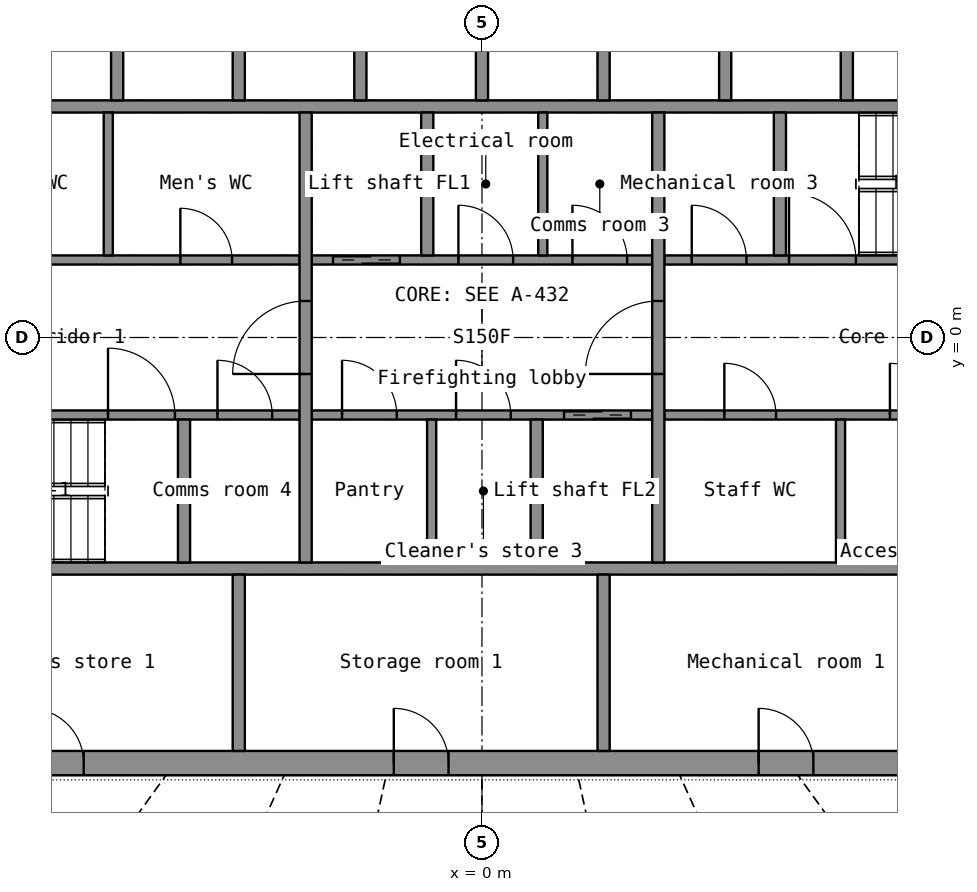
"""IFC4 building model, lengths in metres.
Left out: names, types, materials, properties, quantities, classifications, styles, units other than length and angle.
Written with IfcOpenShell. Run it as: python <this file> out.ifc"""

import sys

from ifc_helpers import new_model, si_unit, direction, frame, frame_2d, origin, place, context, subcontext, project, spatial, rectangle, extrude, element, fill, save


model = new_model("IFC4")
c1 = context("Model", 3, precision=1e-05, world=origin(), true_north=direction((0.0, 1.0)))
c2 = subcontext(c1, "Body", "Model", "MODEL_VIEW")
j1 = project(units=[si_unit("LENGTHUNIT", "METRE"), si_unit("PLANEANGLEUNIT", "RADIAN")], contexts=[c1])
p1 = place(None, origin())
s1 = spatial("IfcSite", under=j1, at=p1, CompositionType="ELEMENT")
p2 = place(p1, origin())
s2 = spatial("IfcBuilding", under=s1, at=p2, CompositionType="ELEMENT")
p3 = place(p2, frame((0.0, 0.0, 257.8)))
s3 = spatial("IfcBuildingStorey", under=s2, at=p3, CompositionType="ELEMENT", Elevation=257.8)
p4 = place(p3, frame((-11.6, -7.0, 0.0), z_axis=(0.0, 0.0, 1.0), x_axis=(1.0, 0.0, 0.0)))
e1 = element("IfcWall", 1, at=p4, inside=s3, PredefinedType="SHEAR", context=c2, shape_type="SweptSolid", body=[
    extrude(rectangle(XDim=23.2, YDim=0.4, at=frame_2d((11.6, 0.0))), origin(), (0.0, 0.0, 1.0), 3.3),
])
p5 = place(p4, frame((20.05, 0.0, 0.0)))
e2 = element("IfcOpeningElement", 2, at=p5, cuts=e1, PredefinedType="OPENING", context=c2, shape_type="SweptSolid", body=[
    extrude(rectangle(XDim=1.1, YDim=2.2, at=frame_2d((0.55, 1.1))), frame((0.0, 0.21, 0.0), z_axis=(0.0, -1.0, 0.0), x_axis=(1.0, 0.0, 0.0)), (0.0, 0.0, 1.0), 0.42),
])
p6 = place(p4, frame((4.15, 0.0, 0.0)))
e3 = element("IfcOpeningElement", 3, at=p6, cuts=e1, PredefinedType="OPENING", context=c2, shape_type="SweptSolid", body=[
    extrude(rectangle(XDim=0.9, YDim=2.1, at=frame_2d((0.45, 1.05))), frame((0.0, 0.21, 0.0), z_axis=(0.0, -1.0, 0.0), x_axis=(1.0, 0.0, 0.0)), (0.0, 0.0, 1.0), 0.42),
])
p7 = place(p4, frame((10.15, 0.0, 0.0)))
e4 = element("IfcOpeningElement", 4, at=p7, cuts=e1, PredefinedType="OPENING", context=c2, shape_type="SweptSolid", body=[
    extrude(rectangle(XDim=0.9, YDim=2.1, at=frame_2d((0.45, 1.05))), frame((0.0, 0.21, 0.0), z_axis=(0.0, -1.0, 0.0), x_axis=(1.0, 0.0, 0.0)), (0.0, 0.0, 1.0), 0.42),
])
p8 = place(p4, frame((16.15, 0.0, 0.0)))
e5 = element("IfcOpeningElement", 5, at=p8, cuts=e1, PredefinedType="OPENING", context=c2, shape_type="SweptSolid", body=[
    extrude(rectangle(XDim=0.9, YDim=2.1, at=frame_2d((0.45, 1.05))), frame((0.0, 0.21, 0.0), z_axis=(0.0, -1.0, 0.0), x_axis=(1.0, 0.0, 0.0)), (0.0, 0.0, 1.0), 0.42),
])
p9 = place(p4, frame((0.35, 0.0, 0.0)))
e6 = element("IfcOpeningElement", 6, at=p9, cuts=e1, PredefinedType="OPENING", context=c2, shape_type="SweptSolid", body=[
    extrude(rectangle(XDim=0.8, YDim=2.05, at=frame_2d((0.4, 1.025))), frame((0.0, 0.21, 0.0), z_axis=(0.0, -1.0, 0.0), x_axis=(1.0, 0.0, 0.0)), (0.0, 0.0, 1.0), 0.42),
])
p10 = place(p4, frame((22.05, 0.0, 0.0)))
e7 = element("IfcOpeningElement", 7, at=p10, cuts=e1, PredefinedType="OPENING", context=c2, shape_type="SweptSolid", body=[
    extrude(rectangle(XDim=0.8, YDim=2.05, at=frame_2d((0.4, 1.025))), frame((0.0, 0.21, 0.0), z_axis=(0.0, -1.0, 0.0), x_axis=(1.0, 0.0, 0.0)), (0.0, 0.0, 1.0), 0.42),
])
for number, where, z_axis, x_axis in (
    (8, (-11.6, -3.8, 0.0), (0.0, 0.0, 1.0), (1.0, 0.0, 0.0)),
    (9, (-11.6, 3.8, 0.0), (0.0, 0.0, 1.0), (1.0, 0.0, 0.0)),
):
    element("IfcWall", number, at=place(p3, frame(where, z_axis=z_axis, x_axis=x_axis)), inside=s3, PredefinedType="SHEAR", context=c2, shape_type="SweptSolid", body=[
        extrude(rectangle(XDim=23.2, YDim=0.2, at=frame_2d((11.6, 0.0))), origin(), (0.0, 0.0, 1.0), 3.3),
    ])
for number, where, z_axis, x_axis in (
    (10, (-4.0, -6.8, 0.0), (0.0, 0.0, 1.0), (0.0, 1.0, 0.0)),
    (11, (2.0, -6.8, 0.0), (0.0, 0.0, 1.0), (0.0, 1.0, 0.0)),
):
    element("IfcWall", number, at=place(p3, frame(where, z_axis=z_axis, x_axis=x_axis)), inside=s3, PredefinedType="PARTITIONING", context=c2, shape_type="SweptSolid", body=[
        extrude(rectangle(XDim=2.9, YDim=0.2, at=frame_2d((1.45, 0.0))), origin(), (0.0, 0.0, 1.0), 3.3),
    ])
for number, where, z_axis, x_axis in (
    (12, (-6.0, 3.9, 0.0), (0.0, 0.0, 1.0), (0.0, 1.0, 0.0)),
    (13, (-4.0, 3.9, 0.0), (0.0, 0.0, 1.0), (0.0, 1.0, 0.0)),
    (14, (-2.0, 3.9, 0.0), (0.0, 0.0, 1.0), (0.0, 1.0, 0.0)),
    (15, (0.0, 3.9, 0.0), (0.0, 0.0, 1.0), (0.0, 1.0, 0.0)),
    (16, (2.0, 3.9, 0.0), (0.0, 0.0, 1.0), (0.0, 1.0, 0.0)),
    (17, (4.0, 3.9, 0.0), (0.0, 0.0, 1.0), (0.0, 1.0, 0.0)),
    (18, (6.0, 3.9, 0.0), (0.0, 0.0, 1.0), (0.0, 1.0, 0.0)),
):
    element("IfcWall", number, at=place(p3, frame(where, z_axis=z_axis, x_axis=x_axis)), inside=s3, PredefinedType="SHEAR", context=c2, shape_type="SweptSolid", body=[
        extrude(rectangle(XDim=2.9, YDim=0.2, at=frame_2d((1.45, 0.0))), origin(), (0.0, 0.0, 1.0), 3.3),
    ])
p11 = place(p3, frame((-11.6, -1.275, 0.0), z_axis=(0.0, 0.0, 1.0), x_axis=(1.0, 0.0, 0.0)))
e19 = element("IfcWall", 19, at=p11, inside=s3, PredefinedType="SHEAR", context=c2, shape_type="SweptSolid", body=[
    extrude(rectangle(XDim=8.6, YDim=0.15, at=frame_2d((4.3, 0.0))), origin(), (0.0, 0.0, 1.0), 3.3),
])
p12 = place(p11, frame((5.45, 0.0, 0.0)))
e20 = element("IfcOpeningElement", 20, at=p12, cuts=e19, PredefinedType="OPENING", context=c2, shape_type="SweptSolid", body=[
    extrude(rectangle(XDim=1.1, YDim=2.15, at=frame_2d((0.55, 1.075))), frame((0.0, 0.085, 0.0), z_axis=(0.0, -1.0, 0.0), x_axis=(1.0, 0.0, 0.0)), (0.0, 0.0, 1.0), 0.17),
])
p13 = place(p11, frame((7.25, 0.0, 0.0)))
e21 = element("IfcOpeningElement", 21, at=p13, cuts=e19, PredefinedType="OPENING", context=c2, shape_type="SweptSolid", body=[
    extrude(rectangle(XDim=0.9, YDim=2.1, at=frame_2d((0.45, 1.05))), frame((0.0, 0.085, 0.0), z_axis=(0.0, -1.0, 0.0), x_axis=(1.0, 0.0, 0.0)), (0.0, 0.0, 1.0), 0.17),
])
p14 = place(p3, frame((-2.8, -1.275, 0.0), z_axis=(0.0, 0.0, 1.0), x_axis=(1.0, 0.0, 0.0)))
e22 = element("IfcWall", 22, at=p14, inside=s3, PredefinedType="SHEAR", context=c2, shape_type="SweptSolid", body=[
    extrude(rectangle(XDim=5.6, YDim=0.15, at=frame_2d((2.8, 0.0))), origin(), (0.0, 0.0, 1.0), 3.3),
])
p15 = place(p14, frame((4.15, 0.0, 0.0)))
e23 = element("IfcOpeningElement", 23, at=p15, cuts=e22, PredefinedType="OPENING", context=c2, shape_type="SweptSolid", body=[
    extrude(rectangle(XDim=1.1, YDim=2.2, at=frame_2d((0.55, 1.1))), frame((0.0, 0.085, 0.0), z_axis=(0.0, -1.0, 0.0), x_axis=(1.0, 0.0, 0.0)), (0.0, 0.0, 1.0), 0.17),
])
p16 = place(p14, frame((0.499, 0.0, 0.0)))
e24 = element("IfcOpeningElement", 24, at=p16, cuts=e22, PredefinedType="OPENING", context=c2, shape_type="SweptSolid", body=[
    extrude(rectangle(XDim=0.9, YDim=2.1, at=frame_2d((0.45, 1.05))), frame((0.0, 0.085, 0.0), z_axis=(0.0, -1.0, 0.0), x_axis=(1.0, 0.0, 0.0)), (0.0, 0.0, 1.0), 0.17),
])
p17 = place(p14, frame((2.374, 0.0, 0.0)))
e25 = element("IfcOpeningElement", 25, at=p17, cuts=e22, PredefinedType="OPENING", context=c2, shape_type="SweptSolid", body=[
    extrude(rectangle(XDim=0.9, YDim=2.1, at=frame_2d((0.45, 1.05))), frame((0.0, 0.085, 0.0), z_axis=(0.0, -1.0, 0.0), x_axis=(1.0, 0.0, 0.0)), (0.0, 0.0, 1.0), 0.17),
])
p18 = place(p3, frame((3.0, -1.275, 0.0), z_axis=(0.0, 0.0, 1.0), x_axis=(1.0, 0.0, 0.0)))
e26 = element("IfcWall", 26, at=p18, inside=s3, PredefinedType="PARTITIONING", context=c2, shape_type="SweptSolid", body=[
    extrude(rectangle(XDim=8.6, YDim=0.15, at=frame_2d((4.3, 0.0))), origin(), (0.0, 0.0, 1.0), 3.3),
])
p19 = place(p18, frame((0.986, 0.0, 0.0)))
e27 = element("IfcOpeningElement", 27, at=p19, cuts=e26, PredefinedType="OPENING", context=c2, shape_type="SweptSolid", body=[
    extrude(rectangle(XDim=0.85, YDim=2.1, at=frame_2d((0.425, 1.05))), frame((0.0, 0.085, 0.0), z_axis=(0.0, -1.0, 0.0), x_axis=(1.0, 0.0, 0.0)), (0.0, 0.0, 1.0), 0.17),
])
p20 = place(p18, frame((3.709, 0.0, 0.0)))
e28 = element("IfcOpeningElement", 28, at=p20, cuts=e26, PredefinedType="OPENING", context=c2, shape_type="SweptSolid", body=[
    extrude(rectangle(XDim=0.85, YDim=2.1, at=frame_2d((0.425, 1.05))), frame((0.0, 0.085, 0.0), z_axis=(0.0, -1.0, 0.0), x_axis=(1.0, 0.0, 0.0)), (0.0, 0.0, 1.0), 0.17),
])
p21 = place(p18, frame((6.573, 0.0, 0.0)))
e29 = element("IfcOpeningElement", 29, at=p21, cuts=e26, PredefinedType="OPENING", context=c2, shape_type="SweptSolid", body=[
    extrude(rectangle(XDim=0.9, YDim=2.1, at=frame_2d((0.45, 1.05))), frame((0.0, 0.085, 0.0), z_axis=(0.0, -1.0, 0.0), x_axis=(1.0, 0.0, 0.0)), (0.0, 0.0, 1.0), 0.17),
])
p22 = place(p3, frame((-11.6, 1.275, 0.0), z_axis=(0.0, 0.0, 1.0), x_axis=(1.0, 0.0, 0.0)))
e30 = element("IfcWall", 30, at=p22, inside=s3, PredefinedType="PARTITIONING", context=c2, shape_type="SweptSolid", body=[
    extrude(rectangle(XDim=8.6, YDim=0.15, at=frame_2d((4.3, 0.0))), origin(), (0.0, 0.0, 1.0), 3.3),
])
p23 = place(p22, frame((0.629, 0.0, 0.0)))
e31 = element("IfcOpeningElement", 31, at=p23, cuts=e30, PredefinedType="OPENING", context=c2, shape_type="SweptSolid", body=[
    extrude(rectangle(XDim=0.9, YDim=2.1, at=frame_2d((0.45, 1.05))), frame((0.0, 0.085, 0.0), z_axis=(0.0, -1.0, 0.0), x_axis=(1.0, 0.0, 0.0)), (0.0, 0.0, 1.0), 0.17),
])
p24 = place(p22, frame((3.418, 0.0, 0.0)))
e32 = element("IfcOpeningElement", 32, at=p24, cuts=e30, PredefinedType="OPENING", context=c2, shape_type="SweptSolid", body=[
    extrude(rectangle(XDim=0.85, YDim=2.1, at=frame_2d((0.425, 1.05))), frame((0.0, 0.085, 0.0), z_axis=(0.0, -1.0, 0.0), x_axis=(1.0, 0.0, 0.0)), (0.0, 0.0, 1.0), 0.17),
])
p25 = place(p22, frame((6.639, 0.0, 0.0)))
e33 = element("IfcOpeningElement", 33, at=p25, cuts=e30, PredefinedType="OPENING", context=c2, shape_type="SweptSolid", body=[
    extrude(rectangle(XDim=0.85, YDim=2.1, at=frame_2d((0.425, 1.05))), frame((0.0, 0.085, 0.0), z_axis=(0.0, -1.0, 0.0), x_axis=(1.0, 0.0, 0.0)), (0.0, 0.0, 1.0), 0.17),
])
p26 = place(p3, frame((-2.8, 1.275, 0.0), z_axis=(0.0, 0.0, 1.0), x_axis=(1.0, 0.0, 0.0)))
e34 = element("IfcWall", 34, at=p26, inside=s3, PredefinedType="SHEAR", context=c2, shape_type="SweptSolid", body=[
    extrude(rectangle(XDim=5.6, YDim=0.15, at=frame_2d((2.8, 0.0))), origin(), (0.0, 0.0, 1.0), 3.3),
])
p27 = place(p26, frame((0.35, 0.0, 0.0)))
e35 = element("IfcOpeningElement", 35, at=p27, cuts=e34, PredefinedType="OPENING", context=c2, shape_type="SweptSolid", body=[
    extrude(rectangle(XDim=1.1, YDim=2.2, at=frame_2d((0.55, 1.1))), frame((0.0, 0.085, 0.0), z_axis=(0.0, -1.0, 0.0), x_axis=(1.0, 0.0, 0.0)), (0.0, 0.0, 1.0), 0.17),
])
p28 = place(p26, frame((2.413, 0.0, 0.0)))
e36 = element("IfcOpeningElement", 36, at=p28, cuts=e34, PredefinedType="OPENING", context=c2, shape_type="SweptSolid", body=[
    extrude(rectangle(XDim=0.9, YDim=2.1, at=frame_2d((0.45, 1.05))), frame((0.0, 0.085, 0.0), z_axis=(0.0, -1.0, 0.0), x_axis=(1.0, 0.0, 0.0)), (0.0, 0.0, 1.0), 0.17),
])
p29 = place(p26, frame((4.288, 0.0, 0.0)))
e37 = element("IfcOpeningElement", 37, at=p29, cuts=e34, PredefinedType="OPENING", context=c2, shape_type="SweptSolid", body=[
    extrude(rectangle(XDim=0.9, YDim=2.1, at=frame_2d((0.45, 1.05))), frame((0.0, 0.085, 0.0), z_axis=(0.0, -1.0, 0.0), x_axis=(1.0, 0.0, 0.0)), (0.0, 0.0, 1.0), 0.17),
])
p30 = place(p3, frame((3.0, 1.275, 0.0), z_axis=(0.0, 0.0, 1.0), x_axis=(1.0, 0.0, 0.0)))
e38 = element("IfcWall", 38, at=p30, inside=s3, PredefinedType="SHEAR", context=c2, shape_type="SweptSolid", body=[
    extrude(rectangle(XDim=8.6, YDim=0.15, at=frame_2d((4.3, 0.0))), origin(), (0.0, 0.0, 1.0), 3.3),
])
p31 = place(p30, frame((2.05, 0.0, 0.0)))
e39 = element("IfcOpeningElement", 39, at=p31, cuts=e38, PredefinedType="OPENING", context=c2, shape_type="SweptSolid", body=[
    extrude(rectangle(XDim=1.1, YDim=2.15, at=frame_2d((0.55, 1.075))), frame((0.0, 0.085, 0.0), z_axis=(0.0, -1.0, 0.0), x_axis=(1.0, 0.0, 0.0)), (0.0, 0.0, 1.0), 0.17),
])
p32 = place(p30, frame((0.45, 0.0, 0.0)))
e40 = element("IfcOpeningElement", 40, at=p32, cuts=e38, PredefinedType="OPENING", context=c2, shape_type="SweptSolid", body=[
    extrude(rectangle(XDim=0.9, YDim=2.1, at=frame_2d((0.45, 1.05))), frame((0.0, 0.085, 0.0), z_axis=(0.0, -1.0, 0.0), x_axis=(1.0, 0.0, 0.0)), (0.0, 0.0, 1.0), 0.17),
])
p33 = place(p3, frame((-2.9, -3.7, 0.0), z_axis=(0.0, 0.0, 1.0), x_axis=(0.0, 1.0, 0.0)))
e41 = element("IfcWall", 41, at=p33, inside=s3, PredefinedType="SHEAR", context=c2, shape_type="SweptSolid", body=[
    extrude(rectangle(XDim=7.4, YDim=0.2, at=frame_2d((3.7, 0.0))), origin(), (0.0, 0.0, 1.0), 3.3),
])
p34 = place(p33, frame((3.1, 0.0, 0.0)))
e42 = element("IfcOpeningElement", 42, at=p34, cuts=e41, PredefinedType="OPENING", context=c2, shape_type="SweptSolid", body=[
    extrude(rectangle(XDim=1.2, YDim=2.2, at=frame_2d((0.6, 1.1))), frame((0.0, 0.11, 0.0), z_axis=(0.0, -1.0, 0.0), x_axis=(1.0, 0.0, 0.0)), (0.0, 0.0, 1.0), 0.22),
])
p35 = place(p3, frame((2.9, -3.7, 0.0), z_axis=(0.0, 0.0, 1.0), x_axis=(0.0, 1.0, 0.0)))
e43 = element("IfcWall", 43, at=p35, inside=s3, PredefinedType="SHEAR", context=c2, shape_type="SweptSolid", body=[
    extrude(rectangle(XDim=7.4, YDim=0.2, at=frame_2d((3.7, 0.0))), origin(), (0.0, 0.0, 1.0), 3.3),
])
p36 = place(p35, frame((3.1, 0.0, 0.0)))
e44 = element("IfcOpeningElement", 44, at=p36, cuts=e43, PredefinedType="OPENING", context=c2, shape_type="SweptSolid", body=[
    extrude(rectangle(XDim=1.2, YDim=2.2, at=frame_2d((0.6, 1.1))), frame((0.0, 0.11, 0.0), z_axis=(0.0, -1.0, 0.0), x_axis=(1.0, 0.0, 0.0)), (0.0, 0.0, 1.0), 0.22),
])
for number, where, z_axis, x_axis in (
    (45, (-0.9, 1.35, 0.0), (0.0, 0.0, 1.0), (0.0, 1.0, 0.0)),
    (46, (0.9, -3.7, 0.0), (0.0, 0.0, 1.0), (0.0, 1.0, 0.0)),
    (47, (-4.9, -3.7, 0.0), (0.0, 0.0, 1.0), (0.0, 1.0, 0.0)),
    (48, (4.9, 1.35, 0.0), (0.0, 0.0, 1.0), (0.0, 1.0, 0.0)),
):
    element("IfcWall", number, at=place(p3, frame(where, z_axis=z_axis, x_axis=x_axis)), inside=s3, PredefinedType="SHEAR", context=c2, shape_type="SweptSolid", body=[
        extrude(rectangle(XDim=2.35, YDim=0.2, at=frame_2d((1.175, 0.0))), origin(), (0.0, 0.0, 1.0), 3.3),
    ])
for number, where, z_axis, x_axis in (
    (49, (-6.146, 1.35, 0.0), (0.0, 0.0, 1.0), (0.0, 1.0, 0.0)),
    (50, (5.897, -3.7, 0.0), (0.0, 0.0, 1.0), (0.0, 1.0, 0.0)),
    (51, (1.0, 1.35, 0.0), (0.0, 0.0, 1.0), (0.0, 1.0, 0.0)),
    (52, (-0.827, -3.7, 0.0), (0.0, 0.0, 1.0), (0.0, 1.0, 0.0)),
):
    element("IfcWall", number, at=place(p3, frame(where, z_axis=z_axis, x_axis=x_axis)), inside=s3, PredefinedType="PARTITIONING", context=c2, shape_type="SweptSolid", body=[
        extrude(rectangle(XDim=2.35, YDim=0.15, at=frame_2d((1.175, 0.0))), origin(), (0.0, 0.0, 1.0), 3.3),
    ])
p37 = place(p6, origin())
e53 = element("IfcDoor", 53, at=p37, inside=s3, OperationType="SINGLE_SWING_LEFT", PredefinedType="DOOR", context=c2, shape_type="SweptSolid", body=[
    extrude(rectangle(XDim=0.9, YDim=2.1, at=frame_2d((0.45, 1.05))), frame((0.0, 0.025, 0.0), z_axis=(0.0, -1.0, 0.0), x_axis=(1.0, 0.0, 0.0)), (0.0, 0.0, 1.0), 0.05),
])
fill(e3, e53)
p38 = place(p7, origin())
e54 = element("IfcDoor", 54, at=p38, inside=s3, OperationType="SINGLE_SWING_LEFT", PredefinedType="DOOR", context=c2, shape_type="SweptSolid", body=[
    extrude(rectangle(XDim=0.9, YDim=2.1, at=frame_2d((0.45, 1.05))), frame((0.0, 0.025, 0.0), z_axis=(0.0, -1.0, 0.0), x_axis=(1.0, 0.0, 0.0)), (0.0, 0.0, 1.0), 0.05),
])
fill(e4, e54)
p39 = place(p8, origin())
e55 = element("IfcDoor", 55, at=p39, inside=s3, OperationType="SINGLE_SWING_LEFT", PredefinedType="DOOR", context=c2, shape_type="SweptSolid", body=[
    extrude(rectangle(XDim=0.9, YDim=2.1, at=frame_2d((0.45, 1.05))), frame((0.0, 0.025, 0.0), z_axis=(0.0, -1.0, 0.0), x_axis=(1.0, 0.0, 0.0)), (0.0, 0.0, 1.0), 0.05),
])
fill(e5, e55)
p40 = place(p34, origin())
e56 = element("IfcDoor", 56, at=p40, inside=s3, OperationType="SINGLE_SWING_LEFT", PredefinedType="DOOR", context=c2, shape_type="SweptSolid", body=[
    extrude(rectangle(XDim=1.2, YDim=2.2, at=frame_2d((0.6, 1.1))), frame((0.0, 0.025, 0.0), z_axis=(0.0, -1.0, 0.0), x_axis=(1.0, 0.0, 0.0)), (0.0, 0.0, 1.0), 0.05),
])
fill(e42, e56)
p41 = place(p36, origin())
e57 = element("IfcDoor", 57, at=p41, inside=s3, OperationType="SINGLE_SWING_LEFT", PredefinedType="DOOR", context=c2, shape_type="SweptSolid", body=[
    extrude(rectangle(XDim=1.2, YDim=2.2, at=frame_2d((0.6, 1.1))), frame((0.0, 0.025, 0.0), z_axis=(0.0, -1.0, 0.0), x_axis=(1.0, 0.0, 0.0)), (0.0, 0.0, 1.0), 0.05),
])
fill(e44, e57)
p42 = place(p27, origin())
e58 = element("IfcDoor", 58, at=p42, inside=s3, OperationType="DOUBLE_DOOR_SLIDING", PredefinedType="DOOR", context=c2, shape_type="SweptSolid", body=[
    extrude(rectangle(XDim=1.1, YDim=2.2, at=frame_2d((0.55, 1.1))), frame((0.0, 0.025, 0.0), z_axis=(0.0, -1.0, 0.0), x_axis=(1.0, 0.0, 0.0)), (0.0, 0.0, 1.0), 0.05),
])
fill(e35, e58)
p43 = place(p15, origin())
e59 = element("IfcDoor", 59, at=p43, inside=s3, OperationType="DOUBLE_DOOR_SLIDING", PredefinedType="DOOR", context=c2, shape_type="SweptSolid", body=[
    extrude(rectangle(XDim=1.1, YDim=2.2, at=frame_2d((0.55, 1.1))), frame((0.0, 0.025, 0.0), z_axis=(0.0, -1.0, 0.0), x_axis=(1.0, 0.0, 0.0)), (0.0, 0.0, 1.0), 0.05),
])
fill(e23, e59)
p44 = place(p12, origin())
e60 = element("IfcDoor", 60, at=p44, inside=s3, OperationType="SINGLE_SWING_LEFT", PredefinedType="DOOR", context=c2, shape_type="SweptSolid", body=[
    extrude(rectangle(XDim=1.1, YDim=2.15, at=frame_2d((0.55, 1.075))), frame((0.0, 0.025, 0.0), z_axis=(0.0, -1.0, 0.0), x_axis=(1.0, 0.0, 0.0)), (0.0, 0.0, 1.0), 0.05),
])
fill(e20, e60)
p45 = place(p31, origin())
e61 = element("IfcDoor", 61, at=p45, inside=s3, OperationType="SINGLE_SWING_LEFT", PredefinedType="DOOR", context=c2, shape_type="SweptSolid", body=[
    extrude(rectangle(XDim=1.1, YDim=2.15, at=frame_2d((0.55, 1.075))), frame((0.0, 0.025, 0.0), z_axis=(0.0, -1.0, 0.0), x_axis=(1.0, 0.0, 0.0)), (0.0, 0.0, 1.0), 0.05),
])
fill(e39, e61)
p46 = place(p25, origin())
e62 = element("IfcDoor", 62, at=p46, inside=s3, OperationType="SINGLE_SWING_LEFT", PredefinedType="DOOR", context=c2, shape_type="SweptSolid", body=[
    extrude(rectangle(XDim=0.85, YDim=2.1, at=frame_2d((0.425, 1.05))), frame((0.0, 0.025, 0.0), z_axis=(0.0, -1.0, 0.0), x_axis=(1.0, 0.0, 0.0)), (0.0, 0.0, 1.0), 0.05),
])
fill(e33, e62)
p47 = place(p19, origin())
e63 = element("IfcDoor", 63, at=p47, inside=s3, OperationType="SINGLE_SWING_LEFT", PredefinedType="DOOR", context=c2, shape_type="SweptSolid", body=[
    extrude(rectangle(XDim=0.85, YDim=2.1, at=frame_2d((0.425, 1.05))), frame((0.0, 0.025, 0.0), z_axis=(0.0, -1.0, 0.0), x_axis=(1.0, 0.0, 0.0)), (0.0, 0.0, 1.0), 0.05),
])
fill(e27, e63)
p48 = place(p20, origin())
e64 = element("IfcDoor", 64, at=p48, inside=s3, OperationType="SINGLE_SWING_LEFT", PredefinedType="DOOR", context=c2, shape_type="SweptSolid", body=[
    extrude(rectangle(XDim=0.85, YDim=2.1, at=frame_2d((0.425, 1.05))), frame((0.0, 0.025, 0.0), z_axis=(0.0, -1.0, 0.0), x_axis=(1.0, 0.0, 0.0)), (0.0, 0.0, 1.0), 0.05),
])
fill(e28, e64)
p49 = place(p28, origin())
e65 = element("IfcDoor", 65, at=p49, inside=s3, OperationType="SINGLE_SWING_LEFT", PredefinedType="DOOR", context=c2, shape_type="SweptSolid", body=[
    extrude(rectangle(XDim=0.9, YDim=2.1, at=frame_2d((0.45, 1.05))), frame((0.0, 0.025, 0.0), z_axis=(0.0, -1.0, 0.0), x_axis=(1.0, 0.0, 0.0)), (0.0, 0.0, 1.0), 0.05),
])
fill(e36, e65)
p50 = place(p29, origin())
e66 = element("IfcDoor", 66, at=p50, inside=s3, OperationType="SINGLE_SWING_LEFT", PredefinedType="DOOR", context=c2, shape_type="SweptSolid", body=[
    extrude(rectangle(XDim=0.9, YDim=2.1, at=frame_2d((0.45, 1.05))), frame((0.0, 0.025, 0.0), z_axis=(0.0, -1.0, 0.0), x_axis=(1.0, 0.0, 0.0)), (0.0, 0.0, 1.0), 0.05),
])
fill(e37, e66)
p51 = place(p16, origin())
e67 = element("IfcDoor", 67, at=p51, inside=s3, OperationType="SINGLE_SWING_LEFT", PredefinedType="DOOR", context=c2, shape_type="SweptSolid", body=[
    extrude(rectangle(XDim=0.9, YDim=2.1, at=frame_2d((0.45, 1.05))), frame((0.0, 0.025, 0.0), z_axis=(0.0, -1.0, 0.0), x_axis=(1.0, 0.0, 0.0)), (0.0, 0.0, 1.0), 0.05),
])
fill(e24, e67)
p52 = place(p17, origin())
e68 = element("IfcDoor", 68, at=p52, inside=s3, OperationType="SINGLE_SWING_LEFT", PredefinedType="DOOR", context=c2, shape_type="SweptSolid", body=[
    extrude(rectangle(XDim=0.9, YDim=2.1, at=frame_2d((0.45, 1.05))), frame((0.0, 0.025, 0.0), z_axis=(0.0, -1.0, 0.0), x_axis=(1.0, 0.0, 0.0)), (0.0, 0.0, 1.0), 0.05),
])
fill(e25, e68)
p53 = place(p32, origin())
e69 = element("IfcDoor", 69, at=p53, inside=s3, OperationType="SINGLE_SWING_LEFT", PredefinedType="DOOR", context=c2, shape_type="SweptSolid", body=[
    extrude(rectangle(XDim=0.9, YDim=2.1, at=frame_2d((0.45, 1.05))), frame((0.0, 0.025, 0.0), z_axis=(0.0, -1.0, 0.0), x_axis=(1.0, 0.0, 0.0)), (0.0, 0.0, 1.0), 0.05),
])
fill(e40, e69)
p54 = place(p13, origin())
e70 = element("IfcDoor", 70, at=p54, inside=s3, OperationType="SINGLE_SWING_LEFT", PredefinedType="DOOR", context=c2, shape_type="SweptSolid", body=[
    extrude(rectangle(XDim=0.9, YDim=2.1, at=frame_2d((0.45, 1.05))), frame((0.0, 0.025, 0.0), z_axis=(0.0, -1.0, 0.0), x_axis=(1.0, 0.0, 0.0)), (0.0, 0.0, 1.0), 0.05),
])
fill(e21, e70)
save(model, sys.argv[1])
